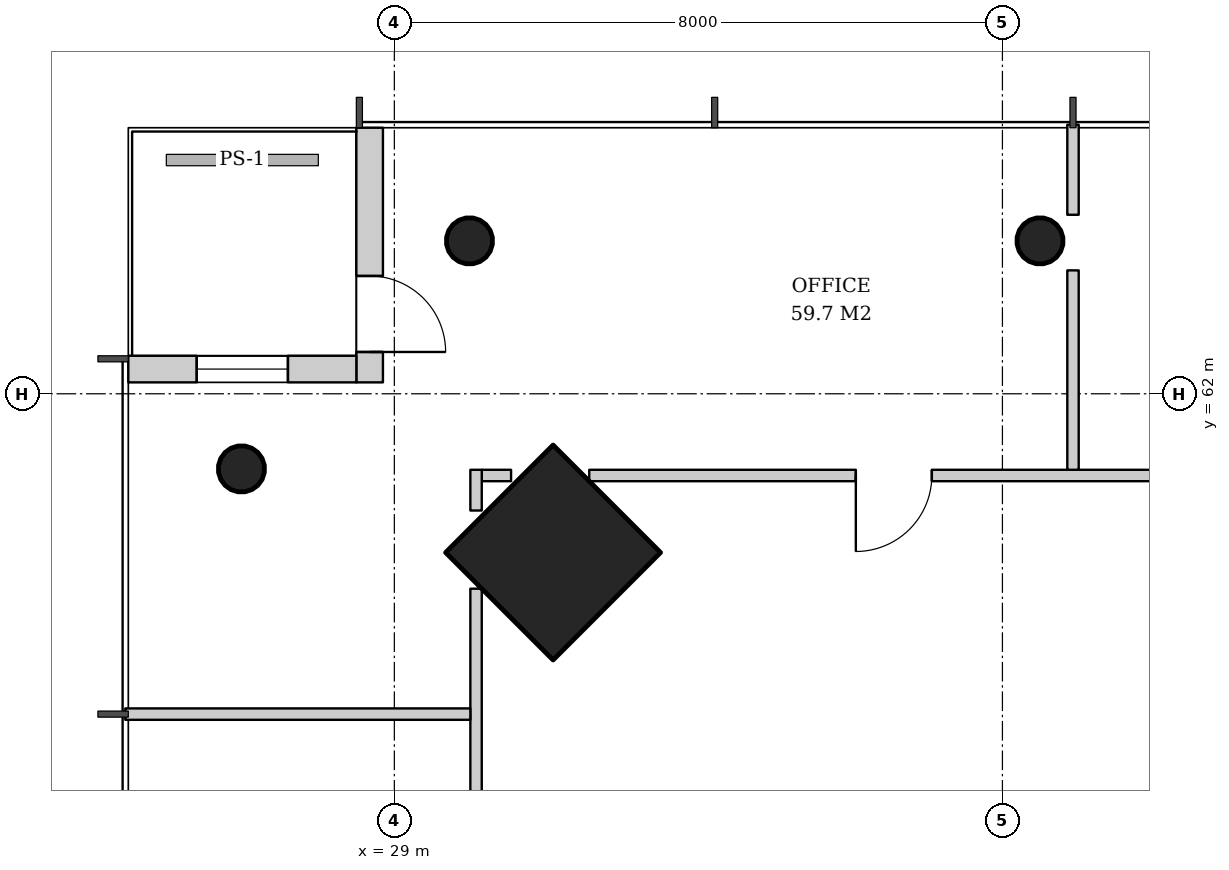
"""IFC4 building model, lengths in metres.
Left out: names, types, materials, properties, quantities, classifications, styles, units other than length and angle.
Written with IfcOpenShell. Run it as: python <this file> out.ifc"""

import sys

from ifc_helpers import new_model, si_unit, direction, frame, frame_2d, origin, origin_2d, place, context, subcontext, project, spatial, rectangle, hollow_circle, extrude, element, fill, save


model = new_model("IFC4")
c1 = context("Model", 3, precision=1e-05, world=origin(), true_north=direction((0.0, 1.0)))
c2 = subcontext(c1, "Body", "Model", "MODEL_VIEW")
j1 = project(units=[si_unit("LENGTHUNIT", "METRE"), si_unit("PLANEANGLEUNIT", "RADIAN")], contexts=[c1])
p1 = place(None, origin())
s1 = spatial("IfcSite", under=j1, at=p1, CompositionType="ELEMENT")
p2 = place(p1, origin())
s2 = spatial("IfcBuilding", under=s1, at=p2, CompositionType="ELEMENT")
p3 = place(p2, frame((0.0, 0.0, 207.2)))
s3 = spatial("IfcBuildingStorey", under=s2, at=p3, CompositionType="ELEMENT", Elevation=207.2)
p4 = place(p3, frame((31.05, 59.95, 0.0), z_axis=(0.031898107953, -0.031898107953, 0.998981992539), x_axis=(0.707106781187, 0.707106781187, 0.0)))
e1 = element("IfcColumn", 1, at=p4, inside=s3, PredefinedType="COLUMN", context=c2, shape_type="SweptSolid", body=[
    extrude(rectangle(XDim=2.0, YDim=2.0, at=origin_2d()), origin(), (0.0, 0.0, 1.0), 3.804),
])
p5 = place(p3, frame((29.95, 64.05, 0.0), z_axis=(0.031962158256, -0.031962158256, 0.998977898093), x_axis=(0.707106781187, 0.707106781187, 0.0)))
e2 = element("IfcColumn", 2, at=p5, inside=s3, PredefinedType="COLUMN", context=c2, shape_type="SweptSolid", body=[
    extrude(hollow_circle(Radius=0.305, WallThickness=0.025, at=origin_2d()), origin(), (0.0, 0.0, 1.0), 3.804),
])
p6 = place(p3, frame((37.475, 64.05, 0.0), z_axis=(0.015923015547, -0.031974442509, 0.999361842679), x_axis=(0.895145027055, 0.445775033553, 0.0)))
e3 = element("IfcColumn", 3, at=p6, inside=s3, PredefinedType="COLUMN", context=c2, shape_type="SweptSolid", body=[
    extrude(hollow_circle(Radius=0.305, WallThickness=0.025, at=origin_2d()), origin(), (0.0, 0.0, 1.0), 3.802),
])
p7 = place(p3, frame((26.95, 61.05, 0.0), z_axis=(0.031962158256, -0.031962158256, 0.998977898093), x_axis=(0.707106781187, 0.707106781187, 0.0)))
e4 = element("IfcColumn", 4, at=p7, inside=s3, PredefinedType="COLUMN", context=c2, shape_type="SweptSolid", body=[
    extrude(hollow_circle(Radius=0.305, WallThickness=0.025, at=origin_2d()), origin(), (0.0, 0.0, 1.0), 3.804),
])
p8 = place(p3, frame((28.675, 65.5, 0.0), z_axis=(0.0, 0.0, 1.0), x_axis=(0.0, -1.0, 0.0)))
e5 = element("IfcWall", 5, at=p8, inside=s3, PredefinedType="SOLIDWALL", context=c2, shape_type="SweptSolid", body=[
    extrude(rectangle(XDim=3.35, YDim=0.35, at=frame_2d((1.675, 0.0))), origin(), (0.0, 0.0, 1.0), 3.62),
])
p9 = place(p8, frame((1.95, 0.0, 0.0)))
e6 = element("IfcOpeningElement", 6, at=p9, cuts=e5, PredefinedType="OPENING", context=c2, shape_type="SweptSolid", body=[
    extrude(rectangle(XDim=1.0, YDim=2.4, at=frame_2d((0.5, 1.2))), frame((0.0, 0.185, 0.0), z_axis=(0.0, -1.0, 0.0), x_axis=(1.0, 0.0, 0.0)), (0.0, 0.0, 1.0), 0.37),
])
p10 = place(p3, frame((28.5, 62.325, 0.0), z_axis=(0.0, 0.0, 1.0), x_axis=(-1.0, 0.0, 0.0)))
e7 = element("IfcWall", 7, at=p10, inside=s3, PredefinedType="SOLIDWALL", context=c2, shape_type="SweptSolid", body=[
    extrude(rectangle(XDim=3.0, YDim=0.35, at=frame_2d((1.5, 0.0))), origin(), (0.0, 0.0, 1.0), 3.62),
])
p11 = place(p10, frame((0.9, 0.0, 0.6)))
e8 = element("IfcOpeningElement", 8, at=p11, cuts=e7, PredefinedType="OPENING", context=c2, shape_type="SweptSolid", body=[
    extrude(rectangle(XDim=1.2, YDim=2.55, at=frame_2d((0.6, 1.275))), frame((0.0, 0.185, 0.0), z_axis=(0.0, -1.0, 0.0), x_axis=(1.0, 0.0, 0.0)), (0.0, 0.0, 1.0), 0.37),
])
p12 = place(p3, frame((58.436, 60.925, 0.0), z_axis=(0.0, 0.0, 1.0), x_axis=(-1.0, 0.0, 0.0)))
e9 = element("IfcWall", 9, at=p12, inside=s3, PredefinedType="PARTITIONING", context=c2, shape_type="SweptSolid", body=[
    extrude(rectangle(XDim=26.872, YDim=0.15, at=frame_2d((13.436, 0.0))), origin(), (0.0, 0.0, 1.0), 2.867),
])
p13 = place(p12, frame((3.507, 0.0, 0.0)))
e10 = element("IfcOpeningElement", 10, at=p13, cuts=e9, PredefinedType="OPENING", context=c2, shape_type="SweptSolid", body=[
    extrude(rectangle(XDim=1.0, YDim=2.1, at=frame_2d((0.5, 1.05))), frame((0.0, 0.085, 0.0), z_axis=(0.0, -1.0, 0.0), x_axis=(1.0, 0.0, 0.0)), (0.0, 0.0, 1.0), 0.17),
])
p14 = place(p12, frame((8.221, 0.0, 0.0)))
e11 = element("IfcOpeningElement", 11, at=p14, cuts=e9, PredefinedType="OPENING", context=c2, shape_type="SweptSolid", body=[
    extrude(rectangle(XDim=1.0, YDim=2.1, at=frame_2d((0.5, 1.05))), frame((0.0, 0.085, 0.0), z_axis=(0.0, -1.0, 0.0), x_axis=(1.0, 0.0, 0.0)), (0.0, 0.0, 1.0), 0.17),
])
p15 = place(p12, frame((12.536, 0.0, 0.0)))
e12 = element("IfcOpeningElement", 12, at=p15, cuts=e9, PredefinedType="OPENING", context=c2, shape_type="SweptSolid", body=[
    extrude(rectangle(XDim=1.8, YDim=2.4, at=frame_2d((0.9, 1.2))), frame((0.0, 0.085, 0.0), z_axis=(0.0, -1.0, 0.0), x_axis=(1.0, 0.0, 0.0)), (0.0, 0.0, 1.0), 0.17),
])
p16 = place(p12, frame((22.364, 0.0, 0.0)))
e13 = element("IfcOpeningElement", 13, at=p16, cuts=e9, PredefinedType="OPENING", context=c2, shape_type="SweptSolid", body=[
    extrude(rectangle(XDim=1.0, YDim=2.1, at=frame_2d((0.5, 1.05))), frame((0.0, 0.085, 0.0), z_axis=(0.0, -1.0, 0.0), x_axis=(1.0, 0.0, 0.0)), (0.0, 0.0, 1.0), 0.17),
])
p17 = place(p3, frame((30.536, 60.925, 0.0), z_axis=(0.0, 0.0, 1.0), x_axis=(-1.0, 0.0, 0.0)))
e14 = element("IfcWall", 14, at=p17, inside=s3, PredefinedType="PARTITIONING", context=c2, shape_type="SweptSolid", body=[
    extrude(rectangle(XDim=0.386, YDim=0.15, at=frame_2d((0.193, 0.0))), origin(), (0.0, 0.0, 1.0), 3.32),
])
p18 = place(p3, frame((37.928, 61.0, 0.0), z_axis=(0.0, 0.0, 1.0), x_axis=(0.0, 1.0, 0.0)))
e15 = element("IfcWall", 15, at=p18, inside=s3, PredefinedType="PARTITIONING", context=c2, shape_type="SweptSolid", body=[
    extrude(rectangle(XDim=2.624, YDim=0.15, at=frame_2d((1.312, 0.0))), origin(), (0.0, 0.0, 1.0), 3.62),
])
p19 = place(p3, frame((37.928, 64.355, 0.0), z_axis=(0.0, 0.0, 1.0), x_axis=(0.0, 1.0, 0.0)))
e16 = element("IfcWall", 16, at=p19, inside=s3, PredefinedType="PARTITIONING", context=c2, shape_type="SweptSolid", body=[
    extrude(rectangle(XDim=1.185, YDim=0.15, at=frame_2d((0.593, 0.0))), origin(), (0.0, 0.0, 1.0), 3.62),
])
p20 = place(p3, frame((30.075, 61.0, 0.0), z_axis=(0.0, 0.0, 1.0), x_axis=(0.0, -1.0, 0.0)))
e17 = element("IfcWall", 17, at=p20, inside=s3, PredefinedType="PARTITIONING", context=c2, shape_type="SweptSolid", body=[
    extrude(rectangle(XDim=0.536, YDim=0.15, at=frame_2d((0.268, 0.0))), origin(), (0.0, 0.0, 1.0), 3.32),
])
p21 = place(p3, frame((30.075, 59.436, 0.0), z_axis=(0.0, 0.0, 1.0), x_axis=(0.0, -1.0, 0.0)))
e18 = element("IfcWall", 18, at=p21, inside=s3, PredefinedType="PARTITIONING", context=c2, shape_type="SweptSolid", body=[
    extrude(rectangle(XDim=26.872, YDim=0.15, at=frame_2d((13.436, 0.0))), origin(), (0.0, 0.0, 1.0), 2.867),
])
p22 = place(p21, frame((3.507, 0.0, 0.0)))
e19 = element("IfcOpeningElement", 19, at=p22, cuts=e18, PredefinedType="OPENING", context=c2, shape_type="SweptSolid", body=[
    extrude(rectangle(XDim=1.0, YDim=2.1, at=frame_2d((0.5, 1.05))), frame((0.0, 0.085, 0.0), z_axis=(0.0, -1.0, 0.0), x_axis=(1.0, 0.0, 0.0)), (0.0, 0.0, 1.0), 0.17),
])
p23 = place(p21, frame((8.221, 0.0, 0.0)))
e20 = element("IfcOpeningElement", 20, at=p23, cuts=e18, PredefinedType="OPENING", context=c2, shape_type="SweptSolid", body=[
    extrude(rectangle(XDim=1.0, YDim=2.1, at=frame_2d((0.5, 1.05))), frame((0.0, 0.085, 0.0), z_axis=(0.0, -1.0, 0.0), x_axis=(1.0, 0.0, 0.0)), (0.0, 0.0, 1.0), 0.17),
])
p24 = place(p21, frame((13.036, 0.0, 0.0)))
e21 = element("IfcOpeningElement", 21, at=p24, cuts=e18, PredefinedType="OPENING", context=c2, shape_type="SweptSolid", body=[
    extrude(rectangle(XDim=0.8, YDim=2.1, at=frame_2d((0.4, 1.05))), frame((0.0, 0.085, 0.0), z_axis=(0.0, -1.0, 0.0), x_axis=(1.0, 0.0, 0.0)), (0.0, 0.0, 1.0), 0.17),
])
p25 = place(p21, frame((17.65, 0.0, 0.0)))
e22 = element("IfcOpeningElement", 22, at=p25, cuts=e18, PredefinedType="OPENING", context=c2, shape_type="SweptSolid", body=[
    extrude(rectangle(XDim=1.0, YDim=2.1, at=frame_2d((0.5, 1.05))), frame((0.0, 0.085, 0.0), z_axis=(0.0, -1.0, 0.0), x_axis=(1.0, 0.0, 0.0)), (0.0, 0.0, 1.0), 0.17),
])
p26 = place(p21, frame((22.464, 0.0, 0.0)))
e23 = element("IfcOpeningElement", 23, at=p26, cuts=e18, PredefinedType="OPENING", context=c2, shape_type="SweptSolid", body=[
    extrude(rectangle(XDim=0.8, YDim=2.1, at=frame_2d((0.4, 1.05))), frame((0.0, 0.085, 0.0), z_axis=(0.0, -1.0, 0.0), x_axis=(1.0, 0.0, 0.0)), (0.0, 0.0, 1.0), 0.17),
])
p27 = place(p3, frame((30.0, 57.786, 0.0), z_axis=(0.0, 0.0, 1.0), x_axis=(-1.0, 0.0, 0.0)))
e24 = element("IfcWall", 24, at=p27, inside=s3, PredefinedType="PARTITIONING", context=c2, shape_type="SweptSolid", body=[
    extrude(rectangle(XDim=4.54, YDim=0.15, at=frame_2d((2.27, 0.0))), origin(), (0.0, 0.0, 1.0), 3.12),
])
p28 = place(p9, origin())
e25 = element("IfcDoor", 25, at=p28, inside=s3, OperationType="SINGLE_SWING_RIGHT", PredefinedType="DOOR", context=c2, shape_type="SweptSolid", body=[
    extrude(rectangle(XDim=1.0, YDim=2.4, at=frame_2d((0.5, 1.2))), frame((0.0, 0.025, 0.0), z_axis=(0.0, -1.0, 0.0), x_axis=(1.0, 0.0, 0.0)), (0.0, 0.0, 1.0), 0.05),
])
fill(e6, e25)
p29 = place(p11, origin())
e26 = element("IfcWindow", 26, at=p29, inside=s3, PartitioningType="SINGLE_PANEL", PredefinedType="WINDOW", context=c2, shape_type="SweptSolid", body=[
    extrude(rectangle(XDim=1.2, YDim=2.55, at=frame_2d((0.6, 1.275))), frame((0.0, 0.03, 0.0), z_axis=(0.0, -1.0, 0.0), x_axis=(1.0, 0.0, 0.0)), (0.0, 0.0, 1.0), 0.06),
])
fill(e8, e26)
p30 = place(p16, origin())
e27 = element("IfcDoor", 27, at=p30, inside=s3, OperationType="SINGLE_SWING_RIGHT", PredefinedType="DOOR", context=c2, shape_type="SweptSolid", body=[
    extrude(rectangle(XDim=1.0, YDim=2.1, at=frame_2d((0.5, 1.05))), frame((0.0, 0.025, 0.0), z_axis=(0.0, -1.0, 0.0), x_axis=(1.0, 0.0, 0.0)), (0.0, 0.0, 1.0), 0.05),
])
fill(e13, e27)
save(model, sys.argv[1])
